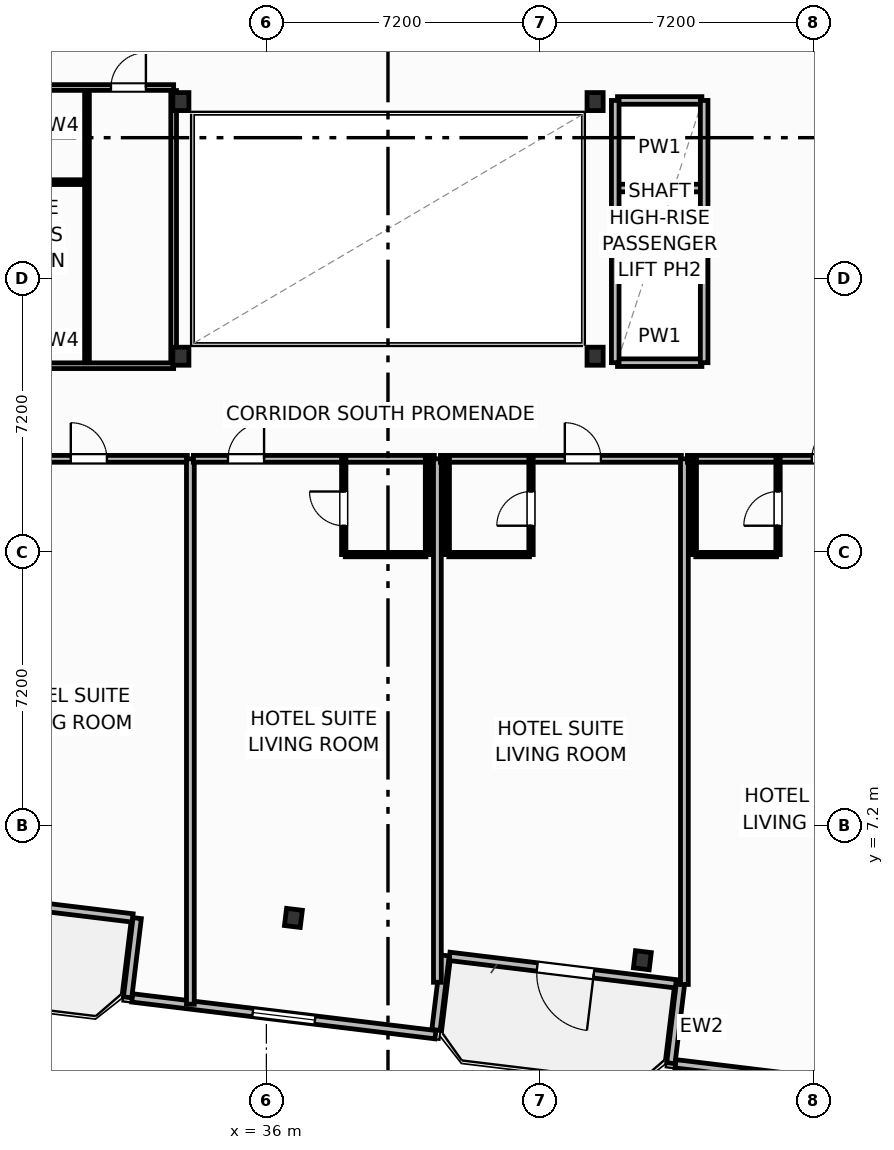
"""IFC4 building model, lengths in metres.
Left out: names, types, materials, properties, quantities, classifications, styles, units other than length and angle.
Written with IfcOpenShell. Run it as: python <this file> out.ifc"""

import sys

from ifc_helpers import new_model, si_unit, direction, frame, frame_2d, origin, origin_2d, place, context, subcontext, project, spatial, rectangle, i_section, extrude, element, fill, save


model = new_model("IFC4")
c1 = context("Model", 3, precision=1e-05, world=origin(), true_north=direction((0.0, 1.0)))
c2 = subcontext(c1, "Body", "Model", "MODEL_VIEW")
j1 = project(units=[si_unit("LENGTHUNIT", "METRE"), si_unit("PLANEANGLEUNIT", "RADIAN")], contexts=[c1])
p1 = place(None, origin())
s1 = spatial("IfcSite", under=j1, at=p1, CompositionType="ELEMENT")
p2 = place(p1, origin())
s2 = spatial("IfcBuilding", under=s1, at=p2, CompositionType="ELEMENT")
p3 = place(p2, frame((0.0, 0.0, 121.7)))
s3 = spatial("IfcBuildingStorey", under=s2, at=p3, CompositionType="ELEMENT", Elevation=121.7)
for number, where, z_axis, x_axis in (
    (1, (33.75, 19.55, 0.0), (0.0, 0.0, 1.0), (1.0, 0.0, 0.0)),
    (2, (44.65, 19.55, 0.0), (0.0, 0.0, 1.0), (1.0, 0.0, 0.0)),
    (3, (33.75, 26.25, 0.0), (0.0, 0.0, 1.0), (1.0, 0.0, 0.0)),
    (4, (44.65, 26.25, 0.0), (0.0, 0.0, 1.0), (1.0, 0.0, 0.0)),
):
    element("IfcColumn", number, at=place(p3, frame(where, z_axis=z_axis, x_axis=x_axis)), inside=s3, PredefinedType="COLUMN", context=c2, shape_type="SweptSolid", body=[
        extrude(i_section(OverallWidth=0.424, OverallDepth=0.474, WebThickness=0.048, FlangeThickness=0.077, FilletRadius=0.025, at=origin_2d()), origin(), (0.0, 0.0, 1.0), 3.7),
    ])
for number, where, z_axis, x_axis in (
    (5, (36.711, 4.77, 0.0), (0.0, 0.0, 1.0), (0.993, -0.12, 0.0)),
    (6, (45.894, 3.657, 0.0), (0.0, 0.0, 1.0), (0.993, -0.12, 0.0)),
):
    element("IfcColumn", number, at=place(p3, frame(where, z_axis=z_axis, x_axis=x_axis)), inside=s3, PredefinedType="COLUMN", context=c2, shape_type="SweptSolid", body=[
        extrude(i_section(OverallWidth=0.418, OverallDepth=0.455, WebThickness=0.042, FlangeThickness=0.068, FilletRadius=0.025, at=origin_2d()), origin(), (0.0, 0.0, 1.0), 3.7),
    ])
p4 = place(p3, frame((32.48, 4.77, 0.0), z_axis=(0.0, 0.0, 1.0), x_axis=(-0.992735402148, 0.120318000826, 0.0)))
e7 = element("IfcWall", 7, at=p4, inside=s3, PredefinedType="SOLIDWALL", context=c2, shape_type="SweptSolid", body=[
    extrude(rectangle(XDim=6.0, YDim=0.22, at=frame_2d((3.0, 0.0))), origin(), (0.0, 0.0, 1.0), 2.73),
])
p5 = place(p4, frame((2.176, 0.0, 0.0)))
e8 = element("IfcOpeningElement", 8, at=p5, cuts=e7, PredefinedType="OPENING", context=c2, shape_type="SweptSolid", body=[
    extrude(rectangle(XDim=1.5, YDim=2.25, at=frame_2d((0.75, 1.125))), frame((0.0, 0.12, 0.0), z_axis=(0.0, -1.0, 0.0), x_axis=(1.0, 0.0, 0.0)), (0.0, 0.0, 1.0), 0.24),
])
p6 = place(p3, frame((46.776, 3.037, 0.0), z_axis=(0.0, 0.0, 1.0), x_axis=(-0.992735402148, 0.120318000826, 0.0)))
e9 = element("IfcWall", 9, at=p6, inside=s3, PredefinedType="SOLIDWALL", context=c2, shape_type="SweptSolid", body=[
    extrude(rectangle(XDim=6.0, YDim=0.22, at=frame_2d((3.0, 0.0))), origin(), (0.0, 0.0, 1.0), 2.73),
])
p7 = place(p6, frame((2.176, 0.0, 0.0)))
e10 = element("IfcOpeningElement", 10, at=p7, cuts=e9, PredefinedType="OPENING", context=c2, shape_type="SweptSolid", body=[
    extrude(rectangle(XDim=1.5, YDim=2.25, at=frame_2d((0.75, 1.125))), frame((0.0, 0.12, 0.0), z_axis=(0.0, -1.0, 0.0), x_axis=(1.0, 0.0, 0.0)), (0.0, 0.0, 1.0), 0.24),
])
p8 = place(p3, frame((32.601, 4.765, 0.0), z_axis=(0.0, 0.0, 1.0), x_axis=(-0.120327895535, -0.992734202874, 0.0)))
e11 = element("IfcWall", 11, at=p8, inside=s3, PredefinedType="SOLIDWALL", context=c2, shape_type="SweptSolid", body=[
    extrude(rectangle(XDim=2.1, YDim=0.22, at=frame_2d((1.05, 0.0))), origin(), (0.0, 0.0, 1.0), 2.73),
])
p9 = place(p3, frame((32.472, 2.665, 0.0), z_axis=(0.0, 0.0, 1.0), x_axis=(0.992734661931, -0.120324108143, 0.0)))
e12 = element("IfcWall", 12, at=p9, inside=s3, PredefinedType="SOLIDWALL", context=c2, shape_type="SweptSolid", body=[
    extrude(rectangle(XDim=8.035, YDim=0.22, at=frame_2d((4.018, 0.0))), origin(), (0.0, 0.0, 1.0), 2.73),
])
p10 = place(p9, frame((3.192, 0.0, 0.8)))
e13 = element("IfcOpeningElement", 13, at=p10, cuts=e12, PredefinedType="OPENING", context=c2, shape_type="SweptSolid", body=[
    extrude(rectangle(XDim=1.65, YDim=1.65, at=frame_2d((0.825, 0.825))), frame((0.0, 0.12, 0.0), z_axis=(0.0, -1.0, 0.0), x_axis=(1.0, 0.0, 0.0)), (0.0, 0.0, 1.0), 0.24),
])
p11 = place(p3, frame((40.464, 1.822, 0.0), z_axis=(0.0, 0.0, 1.0), x_axis=(0.120275992932, 0.992740492538, 0.0)))
e14 = element("IfcWall", 14, at=p11, inside=s3, PredefinedType="SOLIDWALL", context=c2, shape_type="SweptSolid", body=[
    extrude(rectangle(XDim=1.975, YDim=0.22, at=frame_2d((0.988, 0.0))), origin(), (0.0, 0.0, 1.0), 2.73),
])
p12 = place(p3, frame((46.896, 3.032, 0.0), z_axis=(0.0, 0.0, 1.0), x_axis=(-0.120327895535, -0.992734202874, 0.0)))
e15 = element("IfcWall", 15, at=p12, inside=s3, PredefinedType="SOLIDWALL", context=c2, shape_type="SweptSolid", body=[
    extrude(rectangle(XDim=2.1, YDim=0.22, at=frame_2d((1.05, 0.0))), origin(), (0.0, 0.0, 1.0), 2.73),
])
p13 = place(p3, frame((46.768, 0.932, 0.0), z_axis=(0.0, 0.0, 1.0), x_axis=(0.992733036814, -0.120337515419, 0.0)))
e16 = element("IfcWall", 16, at=p13, inside=s3, PredefinedType="SOLIDWALL", context=c2, shape_type="SweptSolid", body=[
    extrude(rectangle(XDim=21.347, YDim=0.22, at=frame_2d((10.673, 0.0))), origin(), (0.0, 0.0, 1.0), 2.73),
])
p14 = place(p13, frame((9.849, 0.0, 0.8)))
e17 = element("IfcOpeningElement", 17, at=p14, cuts=e16, PredefinedType="OPENING", context=c2, shape_type="SweptSolid", body=[
    extrude(rectangle(XDim=1.65, YDim=1.65, at=frame_2d((0.825, 0.825))), frame((0.0, 0.12, 0.0), z_axis=(0.0, -1.0, 0.0), x_axis=(1.0, 0.0, 0.0)), (0.0, 0.0, 1.0), 0.24),
])
p15 = place(p3, frame((27.58, 16.85, 0.0), z_axis=(0.0, 0.0, 1.0), x_axis=(1.0, 0.0, 0.0)))
e18 = element("IfcWall", 18, at=p15, inside=s3, PredefinedType="PARTITIONING", context=c2, shape_type="SweptSolid", body=[
    extrude(rectangle(XDim=6.34, YDim=0.18, at=frame_2d((3.17, 0.0))), origin(), (0.0, 0.0, 1.0), 3.45),
])
p16 = place(p15, frame((3.274, 0.0, 0.0)))
e19 = element("IfcOpeningElement", 19, at=p16, cuts=e18, PredefinedType="OPENING", context=c2, shape_type="SweptSolid", body=[
    extrude(rectangle(XDim=0.95, YDim=2.15, at=frame_2d((0.475, 1.075))), frame((0.0, 0.1, 0.0), z_axis=(0.0, -1.0, 0.0), x_axis=(1.0, 0.0, 0.0)), (0.0, 0.0, 1.0), 0.2),
])
p17 = place(p3, frame((34.0, 2.5, 0.0), z_axis=(0.0, 0.0, 1.0), x_axis=(0.0, 1.0, 0.0)))
e20 = element("IfcWall", 20, at=p17, inside=s3, PredefinedType="PARTITIONING", context=c2, shape_type="SweptSolid", body=[
    extrude(rectangle(XDim=14.35, YDim=0.205, at=frame_2d((7.175, 0.0))), origin(), (0.0, 0.0, 1.0), 3.45),
])
p18 = place(p3, frame((34.08, 16.85, 0.0), z_axis=(0.0, 0.0, 1.0), x_axis=(1.0, 0.0, 0.0)))
e21 = element("IfcWall", 21, at=p18, inside=s3, PredefinedType="PARTITIONING", context=c2, shape_type="SweptSolid", body=[
    extrude(rectangle(XDim=6.34, YDim=0.18, at=frame_2d((3.17, 0.0))), origin(), (0.0, 0.0, 1.0), 3.45),
])
p19 = place(p18, frame((0.91, 0.0, 0.0)))
e22 = element("IfcOpeningElement", 22, at=p19, cuts=e21, PredefinedType="OPENING", context=c2, shape_type="SweptSolid", body=[
    extrude(rectangle(XDim=0.95, YDim=2.15, at=frame_2d((0.475, 1.075))), frame((0.0, 0.1, 0.0), z_axis=(0.0, -1.0, 0.0), x_axis=(1.0, 0.0, 0.0)), (0.0, 0.0, 1.0), 0.2),
])
p20 = place(p3, frame((38.076, 14.33, 0.0), z_axis=(0.0, 0.0, 1.0), x_axis=(1.0, 0.0, 0.0)))
e23 = element("IfcWall", 23, at=p20, inside=s3, PredefinedType="PARTITIONING", context=c2, shape_type="SweptSolid", body=[
    extrude(rectangle(XDim=2.124, YDim=0.115, at=frame_2d((1.062, 0.0))), origin(), (0.0, 0.0, 1.0), 3.45),
])
p21 = place(p3, frame((38.036, 14.33, 0.0), z_axis=(0.0, 0.0, 1.0), x_axis=(0.0, 1.0, 0.0)))
e24 = element("IfcWall", 24, at=p21, inside=s3, PredefinedType="PARTITIONING", context=c2, shape_type="SweptSolid", body=[
    extrude(rectangle(XDim=2.52, YDim=0.115, at=frame_2d((1.26, 0.0))), origin(), (0.0, 0.0, 1.0), 3.45),
])
p22 = place(p21, frame((0.76, 0.0, 0.0)))
e25 = element("IfcOpeningElement", 25, at=p22, cuts=e24, PredefinedType="OPENING", context=c2, shape_type="SweptSolid", body=[
    extrude(rectangle(XDim=0.9, YDim=2.05, at=frame_2d((0.45, 1.025))), frame((0.0, 0.067, 0.0), z_axis=(0.0, -1.0, 0.0), x_axis=(1.0, 0.0, 0.0)), (0.0, 0.0, 1.0), 0.135),
])
p23 = place(p3, frame((40.24, 14.33, 0.0), z_axis=(0.0, 0.0, 1.0), x_axis=(0.0, 1.0, 0.0)))
e26 = element("IfcWall", 26, at=p23, inside=s3, PredefinedType="PARTITIONING", context=c2, shape_type="SweptSolid", body=[
    extrude(rectangle(XDim=2.52, YDim=0.115, at=frame_2d((1.26, 0.0))), origin(), (0.0, 0.0, 1.0), 3.45),
])
p24 = place(p3, frame((40.5, 3.077, 0.0), z_axis=(0.0, 0.0, 1.0), x_axis=(0.0, 1.0, 0.0)))
e27 = element("IfcWall", 27, at=p24, inside=s3, PredefinedType="PARTITIONING", context=c2, shape_type="SweptSolid", body=[
    extrude(rectangle(XDim=13.773, YDim=0.205, at=frame_2d((6.887, 0.0))), origin(), (0.0, 0.0, 1.0), 3.45),
])
p25 = place(p3, frame((40.58, 16.85, 0.0), z_axis=(0.0, 0.0, 1.0), x_axis=(1.0, 0.0, 0.0)))
e28 = element("IfcWall", 28, at=p25, inside=s3, PredefinedType="PARTITIONING", context=c2, shape_type="SweptSolid", body=[
    extrude(rectangle(XDim=6.34, YDim=0.18, at=frame_2d((3.17, 0.0))), origin(), (0.0, 0.0, 1.0), 3.45),
])
p26 = place(p25, frame((3.274, 0.0, 0.0)))
e29 = element("IfcOpeningElement", 29, at=p26, cuts=e28, PredefinedType="OPENING", context=c2, shape_type="SweptSolid", body=[
    extrude(rectangle(XDim=0.95, YDim=2.15, at=frame_2d((0.475, 1.075))), frame((0.0, 0.1, 0.0), z_axis=(0.0, -1.0, 0.0), x_axis=(1.0, 0.0, 0.0)), (0.0, 0.0, 1.0), 0.2),
])
p27 = place(p3, frame((40.8, 14.33, 0.0), z_axis=(0.0, 0.0, 1.0), x_axis=(1.0, 0.0, 0.0)))
e30 = element("IfcWall", 30, at=p27, inside=s3, PredefinedType="PARTITIONING", context=c2, shape_type="SweptSolid", body=[
    extrude(rectangle(XDim=2.124, YDim=0.115, at=frame_2d((1.062, 0.0))), origin(), (0.0, 0.0, 1.0), 3.45),
])
p28 = place(p3, frame((42.964, 14.33, 0.0), z_axis=(0.0, 0.0, 1.0), x_axis=(0.0, 1.0, 0.0)))
e31 = element("IfcWall", 31, at=p28, inside=s3, PredefinedType="PARTITIONING", context=c2, shape_type="SweptSolid", body=[
    extrude(rectangle(XDim=2.52, YDim=0.115, at=frame_2d((1.26, 0.0))), origin(), (0.0, 0.0, 1.0), 3.45),
])
p29 = place(p28, frame((0.76, 0.0, 0.0)))
e32 = element("IfcOpeningElement", 32, at=p29, cuts=e31, PredefinedType="OPENING", context=c2, shape_type="SweptSolid", body=[
    extrude(rectangle(XDim=0.9, YDim=2.05, at=frame_2d((0.45, 1.025))), frame((0.0, 0.067, 0.0), z_axis=(0.0, -1.0, 0.0), x_axis=(1.0, 0.0, 0.0)), (0.0, 0.0, 1.0), 0.135),
])
p30 = place(p3, frame((40.76, 14.33, 0.0), z_axis=(0.0, 0.0, 1.0), x_axis=(0.0, 1.0, 0.0)))
e33 = element("IfcWall", 33, at=p30, inside=s3, PredefinedType="PARTITIONING", context=c2, shape_type="SweptSolid", body=[
    extrude(rectangle(XDim=2.52, YDim=0.115, at=frame_2d((1.26, 0.0))), origin(), (0.0, 0.0, 1.0), 3.45),
])
p31 = place(p3, frame((47.0, 3.019, 0.0), z_axis=(0.0, 0.0, 1.0), x_axis=(0.0, 1.0, 0.0)))
e34 = element("IfcWall", 34, at=p31, inside=s3, PredefinedType="PARTITIONING", context=c2, shape_type="SweptSolid", body=[
    extrude(rectangle(XDim=13.831, YDim=0.205, at=frame_2d((6.916, 0.0))), origin(), (0.0, 0.0, 1.0), 3.45),
])
p32 = place(p3, frame((47.08, 16.85, 0.0), z_axis=(0.0, 0.0, 1.0), x_axis=(1.0, 0.0, 0.0)))
e35 = element("IfcWall", 35, at=p32, inside=s3, PredefinedType="PARTITIONING", context=c2, shape_type="SweptSolid", body=[
    extrude(rectangle(XDim=6.34, YDim=0.18, at=frame_2d((3.17, 0.0))), origin(), (0.0, 0.0, 1.0), 3.45),
])
p33 = place(p32, frame((3.274, 0.0, 0.0)))
e36 = element("IfcOpeningElement", 36, at=p33, cuts=e35, PredefinedType="OPENING", context=c2, shape_type="SweptSolid", body=[
    extrude(rectangle(XDim=0.95, YDim=2.15, at=frame_2d((0.475, 1.075))), frame((0.0, 0.1, 0.0), z_axis=(0.0, -1.0, 0.0), x_axis=(1.0, 0.0, 0.0)), (0.0, 0.0, 1.0), 0.2),
])
p34 = place(p3, frame((47.3, 14.33, 0.0), z_axis=(0.0, 0.0, 1.0), x_axis=(1.0, 0.0, 0.0)))
e37 = element("IfcWall", 37, at=p34, inside=s3, PredefinedType="PARTITIONING", context=c2, shape_type="SweptSolid", body=[
    extrude(rectangle(XDim=2.124, YDim=0.115, at=frame_2d((1.062, 0.0))), origin(), (0.0, 0.0, 1.0), 3.45),
])
p35 = place(p3, frame((49.464, 14.33, 0.0), z_axis=(0.0, 0.0, 1.0), x_axis=(0.0, 1.0, 0.0)))
e38 = element("IfcWall", 38, at=p35, inside=s3, PredefinedType="PARTITIONING", context=c2, shape_type="SweptSolid", body=[
    extrude(rectangle(XDim=2.52, YDim=0.115, at=frame_2d((1.26, 0.0))), origin(), (0.0, 0.0, 1.0), 3.45),
])
p36 = place(p35, frame((0.76, 0.0, 0.0)))
e39 = element("IfcOpeningElement", 39, at=p36, cuts=e38, PredefinedType="OPENING", context=c2, shape_type="SweptSolid", body=[
    extrude(rectangle(XDim=0.9, YDim=2.05, at=frame_2d((0.45, 1.025))), frame((0.0, 0.067, 0.0), z_axis=(0.0, -1.0, 0.0), x_axis=(1.0, 0.0, 0.0)), (0.0, 0.0, 1.0), 0.135),
])
p37 = place(p3, frame((47.26, 14.33, 0.0), z_axis=(0.0, 0.0, 1.0), x_axis=(0.0, 1.0, 0.0)))
e40 = element("IfcWall", 40, at=p37, inside=s3, PredefinedType="PARTITIONING", context=c2, shape_type="SweptSolid", body=[
    extrude(rectangle(XDim=2.52, YDim=0.115, at=frame_2d((1.26, 0.0))), origin(), (0.0, 0.0, 1.0), 3.45),
])
p38 = place(p3, frame((27.46, 19.3, 0.0), z_axis=(0.0, 0.0, 1.0), x_axis=(1.0, 0.0, 0.0)))
e41 = element("IfcWall", 41, at=p38, inside=s3, PredefinedType="PARTITIONING", context=c2, shape_type="SweptSolid", body=[
    extrude(rectangle(XDim=6.1, YDim=0.15, at=frame_2d((3.05, 0.0))), origin(), (0.0, 0.0, 1.0), 2.662),
])
p39 = place(p3, frame((27.46, 26.62, 0.0), z_axis=(0.0, 0.0, 1.0), x_axis=(1.0, 0.0, 0.0)))
e42 = element("IfcWall", 42, at=p39, inside=s3, PredefinedType="PARTITIONING", context=c2, shape_type="SweptSolid", body=[
    extrude(rectangle(XDim=6.1, YDim=0.15, at=frame_2d((3.05, 0.0))), origin(), (0.0, 0.0, 1.0), 2.662),
])
p40 = place(p39, frame((1.15, 0.0, 0.0)))
e43 = element("IfcOpeningElement", 43, at=p40, cuts=e42, PredefinedType="OPENING", context=c2, shape_type="SweptSolid", body=[
    extrude(rectangle(XDim=0.9, YDim=2.05, at=frame_2d((0.45, 1.025))), frame((0.0, 0.085, 0.0), z_axis=(0.0, -1.0, 0.0), x_axis=(1.0, 0.0, 0.0)), (0.0, 0.0, 1.0), 0.17),
])
p41 = place(p39, frame((4.45, 0.0, 0.0)))
e44 = element("IfcOpeningElement", 44, at=p41, cuts=e42, PredefinedType="OPENING", context=c2, shape_type="SweptSolid", body=[
    extrude(rectangle(XDim=0.92, YDim=2.05, at=frame_2d((0.46, 1.025))), frame((0.0, 0.085, 0.0), z_axis=(0.0, -1.0, 0.0), x_axis=(1.0, 0.0, 0.0)), (0.0, 0.0, 1.0), 0.17),
])
p42 = place(p3, frame((31.28, 19.38, 0.0), z_axis=(0.0, 0.0, 1.0), x_axis=(0.0, 1.0, 0.0)))
e45 = element("IfcWall", 45, at=p42, inside=s3, PredefinedType="PARTITIONING", context=c2, shape_type="SweptSolid", body=[
    extrude(rectangle(XDim=7.16, YDim=0.125, at=frame_2d((3.58, 0.0))), origin(), (0.0, 0.0, 1.0), 3.45),
])
p43 = place(p3, frame((27.52, 24.13, 0.0), z_axis=(0.0, 0.0, 1.0), x_axis=(1.0, 0.0, 0.0)))
e46 = element("IfcWall", 46, at=p43, inside=s3, PredefinedType="PARTITIONING", context=c2, shape_type="SweptSolid", body=[
    extrude(rectangle(XDim=3.7, YDim=0.125, at=frame_2d((1.85, 0.0))), origin(), (0.0, 0.0, 1.0), 3.45),
])
p44 = place(p3, frame((33.56, 19.38, 0.0), z_axis=(0.0, 0.0, 1.0), x_axis=(0.0, 1.0, 0.0)))
e47 = element("IfcWall", 47, at=p44, inside=s3, PredefinedType="PARTITIONING", context=c2, shape_type="SweptSolid", body=[
    extrude(rectangle(XDim=7.16, YDim=0.15, at=frame_2d((3.58, 0.0))), origin(), (0.0, 0.0, 1.0), 2.824),
])
for number, where, z_axis, x_axis in (
    (48, (45.24, 21.675, 0.0), (0.0, 0.0, 1.0), (1.0, 0.0, 0.0)),
    (49, (45.24, 23.975, 0.0), (0.0, 0.0, 1.0), (1.0, 0.0, 0.0)),
):
    element("IfcWall", number, at=place(p3, frame(where, z_axis=z_axis, x_axis=x_axis)), inside=s3, PredefinedType="PARTITIONING", context=c2, shape_type="SweptSolid", body=[
        extrude(rectangle(XDim=2.22, YDim=0.2, at=frame_2d((1.11, 0.0))), origin(), (0.0, 0.0, 1.0), 3.45),
    ])
p45 = place(p3, frame((45.24, 19.38, 0.0), z_axis=(0.0, 0.0, 1.0), x_axis=(1.0, 0.0, 0.0)))
e50 = element("IfcWall", 50, at=p45, inside=s3, PredefinedType="PARTITIONING", context=c2, shape_type="SweptSolid", body=[
    extrude(rectangle(XDim=2.22, YDim=0.2, at=frame_2d((1.11, 0.0))), origin(), (0.0, 0.0, 1.0), 2.662),
])
p46 = place(p3, frame((45.24, 26.28, 0.0), z_axis=(0.0, 0.0, 1.0), x_axis=(1.0, 0.0, 0.0)))
e51 = element("IfcWall", 51, at=p46, inside=s3, PredefinedType="PARTITIONING", context=c2, shape_type="SweptSolid", body=[
    extrude(rectangle(XDim=2.22, YDim=0.2, at=frame_2d((1.11, 0.0))), origin(), (0.0, 0.0, 1.0), 3.45),
])
for number, where, z_axis, x_axis in (
    (52, (45.18, 19.38, 0.0), (0.0, 0.0, 1.0), (0.0, 1.0, 0.0)),
    (53, (47.52, 19.38, 0.0), (0.0, 0.0, 1.0), (0.0, 1.0, 0.0)),
):
    element("IfcWall", number, at=place(p3, frame(where, z_axis=z_axis, x_axis=x_axis)), inside=s3, PredefinedType="PARTITIONING", context=c2, shape_type="SweptSolid", body=[
        extrude(rectangle(XDim=6.9, YDim=0.2, at=frame_2d((3.45, 0.0))), origin(), (0.0, 0.0, 1.0), 3.45),
    ])
p47 = place(p7, origin())
e54 = element("IfcDoor", 54, at=p47, inside=s3, OperationType="SINGLE_SWING_LEFT", PredefinedType="DOOR", context=c2, shape_type="SweptSolid", body=[
    extrude(rectangle(XDim=1.5, YDim=2.25, at=frame_2d((0.75, 1.125))), frame((0.0, 0.025, 0.0), z_axis=(0.0, -1.0, 0.0), x_axis=(1.0, 0.0, 0.0)), (0.0, 0.0, 1.0), 0.05),
])
fill(e10, e54)
p48 = place(p10, origin())
e55 = element("IfcWindow", 55, at=p48, inside=s3, PartitioningType="SINGLE_PANEL", PredefinedType="WINDOW", context=c2, shape_type="SweptSolid", body=[
    extrude(rectangle(XDim=1.65, YDim=1.65, at=frame_2d((0.825, 0.825))), frame((0.0, 0.03, 0.0), z_axis=(0.0, -1.0, 0.0), x_axis=(1.0, 0.0, 0.0)), (0.0, 0.0, 1.0), 0.06),
])
fill(e13, e55)
p49 = place(p16, origin())
e56 = element("IfcDoor", 56, at=p49, inside=s3, OperationType="SINGLE_SWING_LEFT", PredefinedType="DOOR", context=c2, shape_type="SweptSolid", body=[
    extrude(rectangle(XDim=0.95, YDim=2.15, at=frame_2d((0.475, 1.075))), frame((0.0, 0.025, 0.0), z_axis=(0.0, -1.0, 0.0), x_axis=(1.0, 0.0, 0.0)), (0.0, 0.0, 1.0), 0.05),
])
fill(e19, e56)
p50 = place(p19, origin())
e57 = element("IfcDoor", 57, at=p50, inside=s3, OperationType="SINGLE_SWING_RIGHT", PredefinedType="DOOR", context=c2, shape_type="SweptSolid", body=[
    extrude(rectangle(XDim=0.95, YDim=2.15, at=frame_2d((0.475, 1.075))), frame((0.0, 0.025, 0.0), z_axis=(0.0, -1.0, 0.0), x_axis=(1.0, 0.0, 0.0)), (0.0, 0.0, 1.0), 0.05),
])
fill(e22, e57)
p51 = place(p22, origin())
e58 = element("IfcDoor", 58, at=p51, inside=s3, OperationType="SINGLE_SWING_RIGHT", PredefinedType="DOOR", context=c2, shape_type="SweptSolid", body=[
    extrude(rectangle(XDim=0.9, YDim=2.05, at=frame_2d((0.45, 1.025))), frame((0.0, 0.025, 0.0), z_axis=(0.0, -1.0, 0.0), x_axis=(1.0, 0.0, 0.0)), (0.0, 0.0, 1.0), 0.05),
])
fill(e25, e58)
p52 = place(p26, origin())
e59 = element("IfcDoor", 59, at=p52, inside=s3, OperationType="SINGLE_SWING_LEFT", PredefinedType="DOOR", context=c2, shape_type="SweptSolid", body=[
    extrude(rectangle(XDim=0.95, YDim=2.15, at=frame_2d((0.475, 1.075))), frame((0.0, 0.025, 0.0), z_axis=(0.0, -1.0, 0.0), x_axis=(1.0, 0.0, 0.0)), (0.0, 0.0, 1.0), 0.05),
])
fill(e29, e59)
p53 = place(p29, origin())
e60 = element("IfcDoor", 60, at=p53, inside=s3, OperationType="SINGLE_SWING_LEFT", PredefinedType="DOOR", context=c2, shape_type="SweptSolid", body=[
    extrude(rectangle(XDim=0.9, YDim=2.05, at=frame_2d((0.45, 1.025))), frame((0.0, 0.025, 0.0), z_axis=(0.0, -1.0, 0.0), x_axis=(1.0, 0.0, 0.0)), (0.0, 0.0, 1.0), 0.05),
])
fill(e32, e60)
p54 = place(p33, origin())
e61 = element("IfcDoor", 61, at=p54, inside=s3, OperationType="SINGLE_SWING_RIGHT", PredefinedType="DOOR", context=c2, shape_type="SweptSolid", body=[
    extrude(rectangle(XDim=0.95, YDim=2.15, at=frame_2d((0.475, 1.075))), frame((0.0, 0.025, 0.0), z_axis=(0.0, -1.0, 0.0), x_axis=(1.0, 0.0, 0.0)), (0.0, 0.0, 1.0), 0.05),
])
fill(e36, e61)
p55 = place(p36, origin())
e62 = element("IfcDoor", 62, at=p55, inside=s3, OperationType="SINGLE_SWING_LEFT", PredefinedType="DOOR", context=c2, shape_type="SweptSolid", body=[
    extrude(rectangle(XDim=0.9, YDim=2.05, at=frame_2d((0.45, 1.025))), frame((0.0, 0.025, 0.0), z_axis=(0.0, -1.0, 0.0), x_axis=(1.0, 0.0, 0.0)), (0.0, 0.0, 1.0), 0.05),
])
fill(e39, e62)
p56 = place(p41, origin())
e63 = element("IfcDoor", 63, at=p56, inside=s3, OperationType="SINGLE_SWING_RIGHT", PredefinedType="DOOR", context=c2, shape_type="SweptSolid", body=[
    extrude(rectangle(XDim=0.92, YDim=2.05, at=frame_2d((0.46, 1.025))), frame((0.0, 0.025, 0.0), z_axis=(0.0, -1.0, 0.0), x_axis=(1.0, 0.0, 0.0)), (0.0, 0.0, 1.0), 0.05),
])
fill(e44, e63)
save(model, sys.argv[1])
